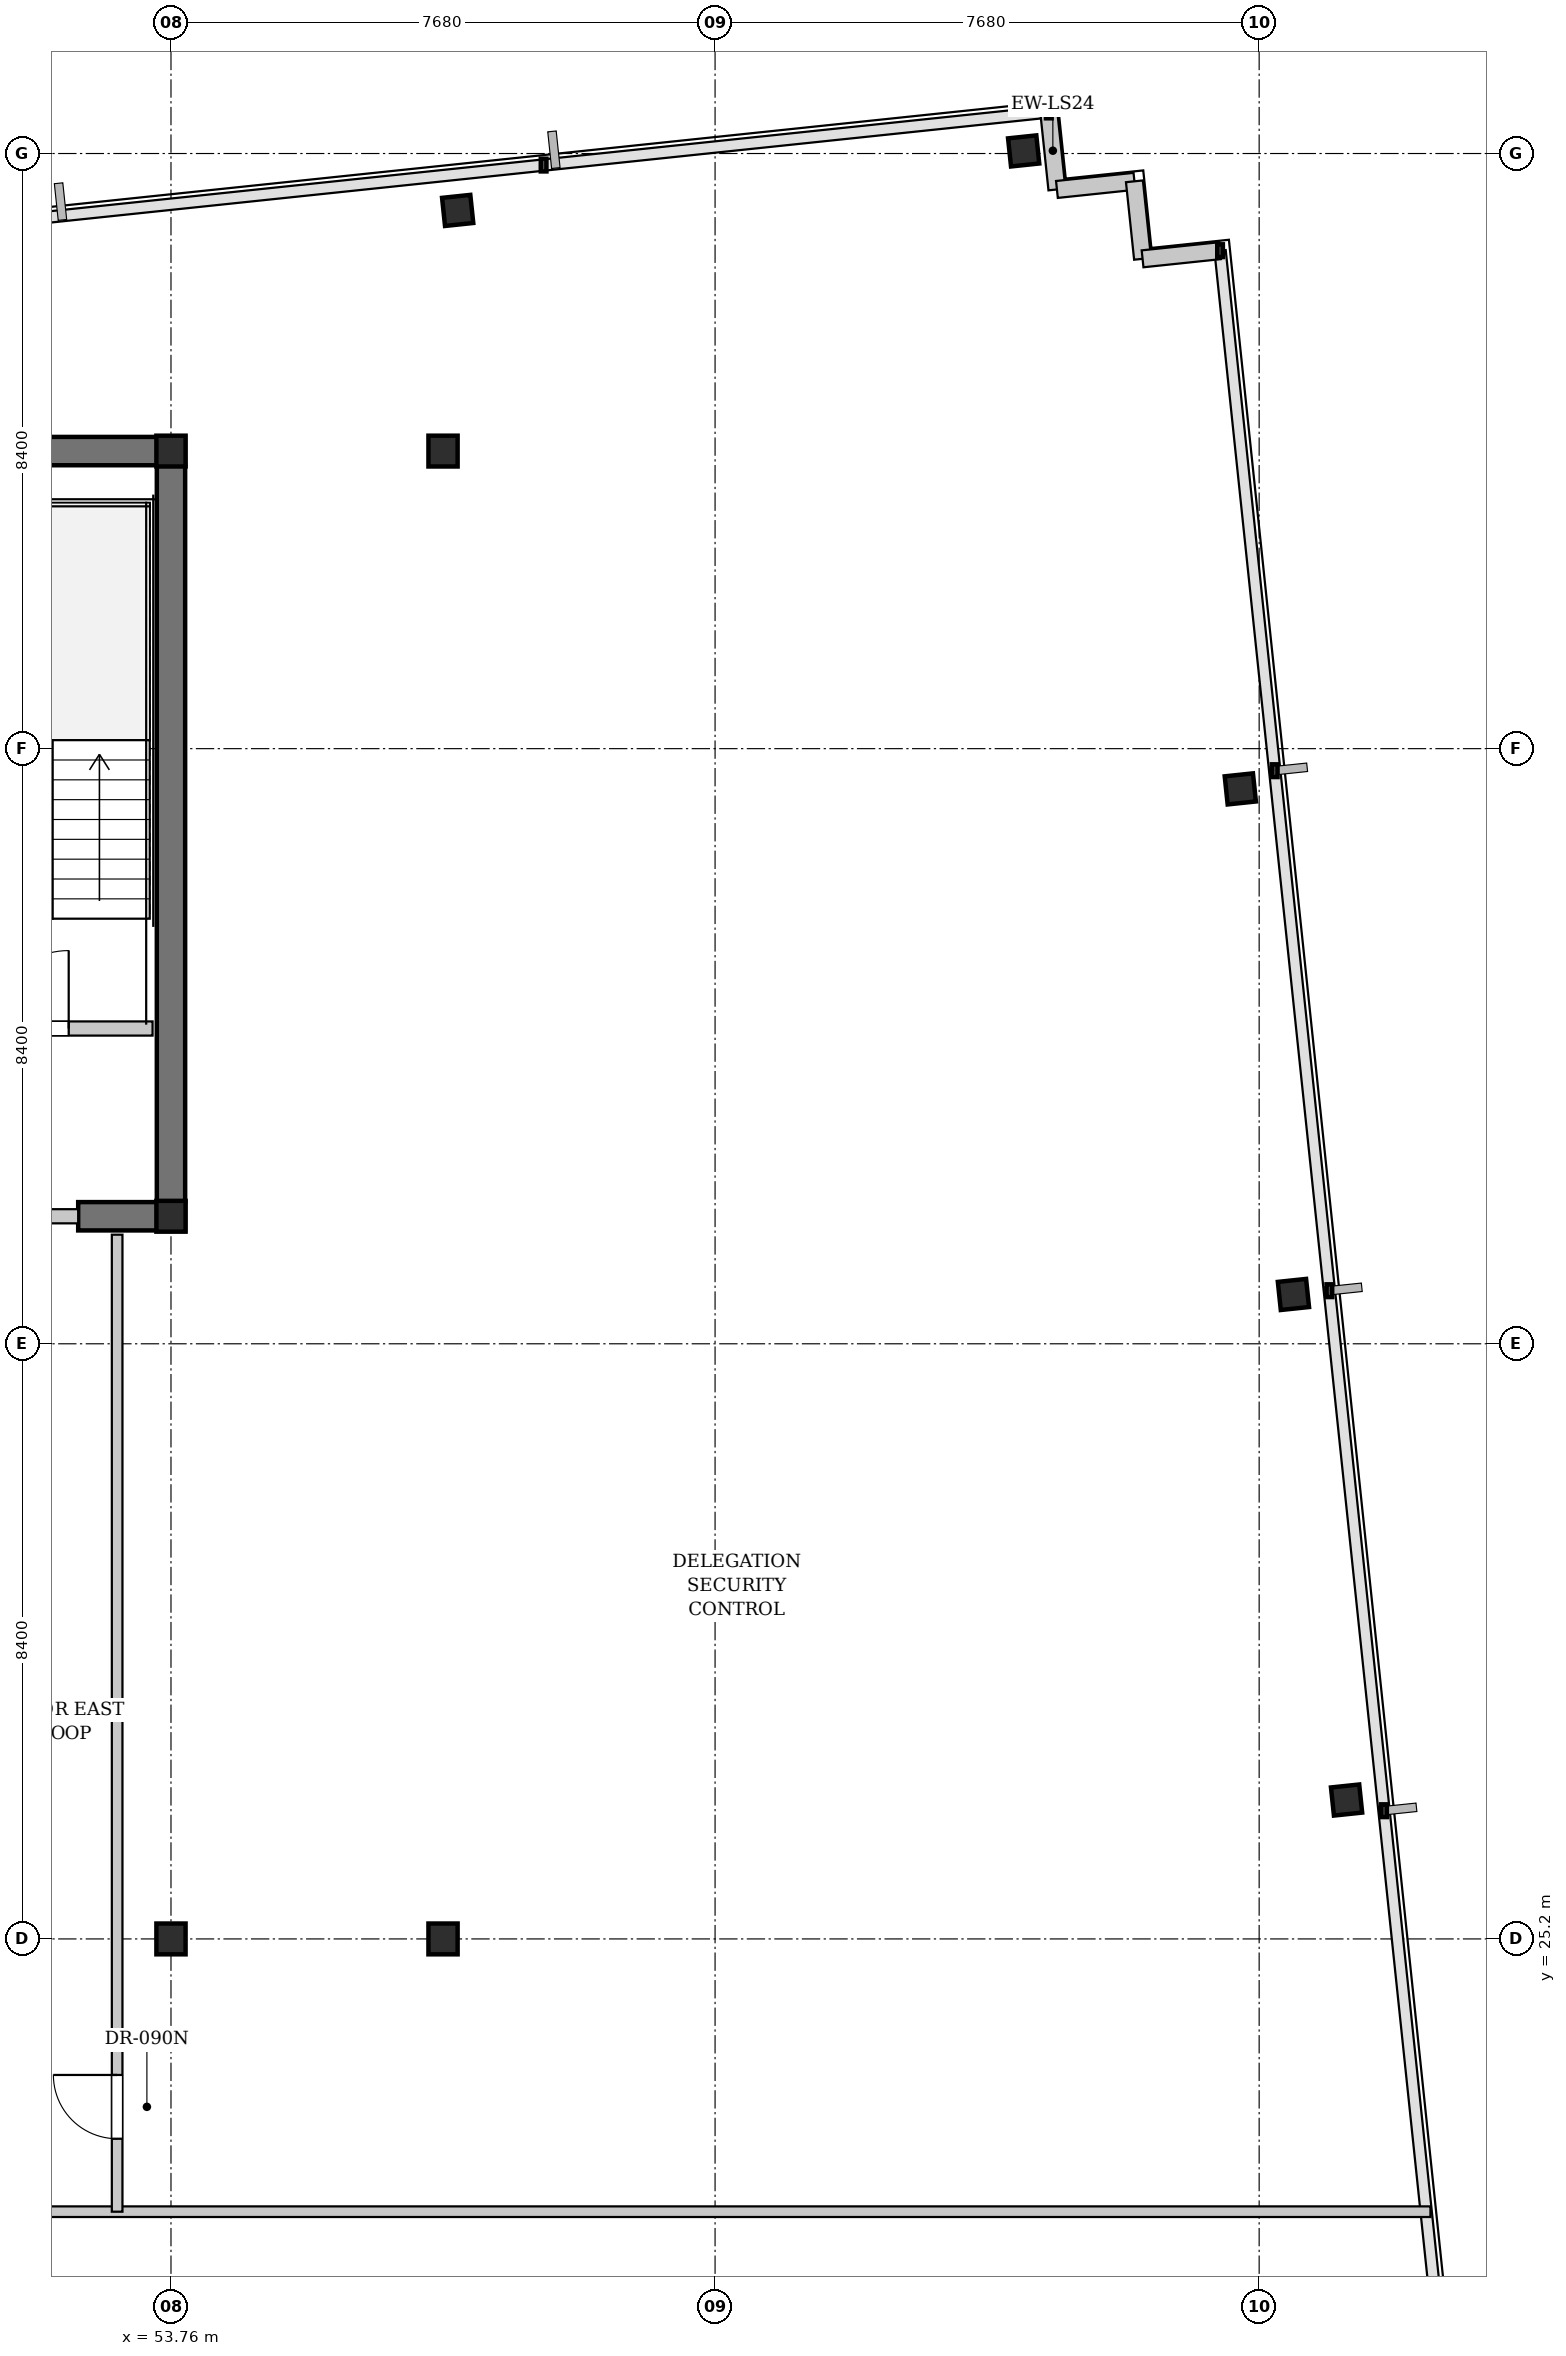
"""IFC4 building model, lengths in metres.
Left out: names, types, materials, properties, quantities, classifications, styles, units other than length and angle.
Written with IfcOpenShell. Run it as: python <this file> out.ifc"""

import sys

from ifc_helpers import new_model, si_unit, direction, frame, frame_2d, origin, origin_2d, place, context, subcontext, project, spatial, rectangle, i_section, extrude, element, fill, save


model = new_model("IFC4")
c1 = context("Model", 3, precision=1e-05, world=origin(), true_north=direction((0.0, 1.0)))
c2 = subcontext(c1, "Body", "Model", "MODEL_VIEW")
j1 = project(units=[si_unit("LENGTHUNIT", "METRE"), si_unit("PLANEANGLEUNIT", "RADIAN")], contexts=[c1])
p1 = place(None, origin())
s1 = spatial("IfcSite", under=j1, at=p1, CompositionType="ELEMENT")
p2 = place(p1, origin())
s2 = spatial("IfcBuilding", under=s1, at=p2, CompositionType="ELEMENT")
p3 = place(p2, frame((0.0, 0.0, 227.6)))
s3 = spatial("IfcBuildingStorey", under=s2, at=p3, CompositionType="ELEMENT", Elevation=227.6)
p4 = place(p3, frame((22.84, 46.2, 0.0), z_axis=(0.0, 0.0, 1.0), x_axis=(1.0, 0.0, 0.0)))
e1 = element("IfcWall", 1, at=p4, inside=s3, PredefinedType="SHEAR", context=c2, shape_type="SweptSolid", body=[
    extrude(rectangle(XDim=31.12, YDim=0.4, at=frame_2d((15.56, 0.0))), origin(), (0.0, 0.0, 1.0), 3.08),
])
p5 = place(p3, frame((52.45, 35.4, 0.0), z_axis=(0.0, 0.0, 1.0), x_axis=(1.0, 0.0, 0.0)))
e2 = element("IfcWall", 2, at=p5, inside=s3, PredefinedType="SHEAR", context=c2, shape_type="SweptSolid", body=[
    extrude(rectangle(XDim=1.51, YDim=0.4, at=frame_2d((0.755, 0.0))), origin(), (0.0, 0.0, 1.0), 3.08),
])
p6 = place(p3, frame((53.76, 35.6, 0.0), z_axis=(0.0, 0.0, 1.0), x_axis=(0.0, 1.0, 0.0)))
e3 = element("IfcWall", 3, at=p6, inside=s3, PredefinedType="SHEAR", context=c2, shape_type="SweptSolid", body=[
    extrude(rectangle(XDim=10.4, YDim=0.4, at=frame_2d((5.2, 0.0))), origin(), (0.0, 0.0, 1.0), 3.08),
])
for number, where, z_axis, x_axis in (
    (4, (53.76, 35.4, 0.0), (0.0, 0.0, 1.0), (1.0, 0.0, 0.0)),
    (5, (53.76, 46.2, 0.0), (0.0, 0.0, 1.0), (1.0, 0.0, 0.0)),
    (6, (53.76, 25.2, 0.0), (0.0, 0.0, 1.0), (1.0, 0.0, 0.0)),
    (7, (57.6, 25.2, 0.0), (0.0, 0.0, 1.0), (1.0, 0.0, 0.0)),
    (8, (57.6, 46.2, 0.0), (0.0, 0.0, 1.0), (1.0, 0.0, 0.0)),
):
    element("IfcColumn", number, at=place(p3, frame(where, z_axis=z_axis, x_axis=x_axis)), inside=s3, PredefinedType="COLUMN", context=c2, shape_type="SweptSolid", body=[
        extrude(i_section(OverallWidth=0.412, OverallDepth=0.435, WebThickness=0.036, FlangeThickness=0.058, FilletRadius=0.015, at=origin_2d()), origin(), (0.0, 0.0, 1.0), 3.3),
    ])
for number, where, z_axis, x_axis in (
    (9, (57.807, 49.597, 0.0), (0.0, 0.0, 1.0), (0.995, 0.105, 0.0)),
    (10, (65.796, 50.437, 0.0), (0.0, 0.0, 1.0), (0.995, 0.105, 0.0)),
    (11, (70.354, 27.16, 0.0), (0.0, 0.0, 1.0), (0.995, 0.105, 0.0)),
    (12, (69.604, 34.296, 0.0), (0.0, 0.0, 1.0), (0.995, 0.105, 0.0)),
    (13, (68.854, 41.432, 0.0), (0.0, 0.0, 1.0), (0.995, 0.105, 0.0)),
):
    element("IfcColumn", number, at=place(p3, frame(where, z_axis=z_axis, x_axis=x_axis)), inside=s3, PredefinedType="COLUMN", context=c2, shape_type="SweptSolid", body=[
        extrude(i_section(OverallWidth=0.401, OverallDepth=0.399, WebThickness=0.025, FlangeThickness=0.04, FilletRadius=0.015, at=origin_2d()), origin(), (0.0, 0.0, 1.0), 3.3),
    ])
for number, where, z_axis, x_axis in (
    (14, (66.15, 50.987, 0.0), (0.0, 0.0, 1.0), (0.105, -0.995, 0.0)),
    (15, (66.265, 49.893, 0.0), (0.0, 0.0, 1.0), (0.995, 0.105, 0.0)),
    (16, (67.359, 50.008, 0.0), (0.0, 0.0, 1.0), (0.105, -0.995, 0.0)),
    (17, (67.474, 48.914, 0.0), (0.0, 0.0, 1.0), (0.995, 0.105, 0.0)),
):
    element("IfcWall", number, at=place(p3, frame(where, z_axis=z_axis, x_axis=x_axis)), inside=s3, PredefinedType="SOLIDWALL", context=c2, shape_type="SweptSolid", body=[
        extrude(rectangle(XDim=1.1, YDim=0.24, at=frame_2d((0.55, 0.0))), origin(), (0.0, 0.0, 1.0), 3.08),
    ])
p7 = place(p3, frame((49.78, 38.05, 0.0), z_axis=(0.0, 0.0, 1.0), x_axis=(1.0, 0.0, 0.0)))
e18 = element("IfcWall", 18, at=p7, inside=s3, PredefinedType="PARTITIONING", context=c2, shape_type="SweptSolid", body=[
    extrude(rectangle(XDim=3.72, YDim=0.2, at=frame_2d((1.86, 0.0))), origin(), (0.0, 0.0, 1.0), 3.08),
])
p8 = place(p7, frame((1.436, 0.0, 0.0)))
e19 = element("IfcOpeningElement", 19, at=p8, cuts=e18, PredefinedType="OPENING", context=c2, shape_type="SweptSolid", body=[
    extrude(rectangle(XDim=1.1, YDim=2.15, at=frame_2d((0.55, 1.075))), frame((0.0, 0.11, 0.0), z_axis=(0.0, -1.0, 0.0), x_axis=(1.0, 0.0, 0.0)), (0.0, 0.0, 1.0), 0.22),
])
p9 = place(p3, frame((50.15, 35.4, 0.0), z_axis=(0.0, 0.0, 1.0), x_axis=(1.0, 0.0, 0.0)))
e20 = element("IfcWall", 20, at=p9, inside=s3, PredefinedType="PARTITIONING", context=c2, shape_type="SweptSolid", body=[
    extrude(rectangle(XDim=2.3, YDim=0.2, at=frame_2d((1.15, 0.0))), origin(), (0.0, 0.0, 1.0), 2.313),
])
p10 = place(p9, frame((0.6, 0.0, 0.0)))
e21 = element("IfcOpeningElement", 21, at=p10, cuts=e20, PredefinedType="OPENING", context=c2, shape_type="SweptSolid", body=[
    extrude(rectangle(XDim=1.1, YDim=2.15, at=frame_2d((0.55, 1.075))), frame((0.0, 0.11, 0.0), z_axis=(0.0, -1.0, 0.0), x_axis=(1.0, 0.0, 0.0)), (0.0, 0.0, 1.0), 0.22),
])
p11 = place(p3, frame((35.62, 21.35, 0.0), z_axis=(0.0, 0.0, 1.0), x_axis=(1.0, 0.0, 0.0)))
e22 = element("IfcWall", 22, at=p11, inside=s3, PredefinedType="PARTITIONING", context=c2, shape_type="SweptSolid", body=[
    extrude(rectangle(XDim=35.918, YDim=0.15, at=frame_2d((17.959, 0.0))), origin(), (0.0, 0.0, 1.0), 3.08),
])
p12 = place(p11, frame((2.376, 0.0, 0.0)))
e23 = element("IfcOpeningElement", 23, at=p12, cuts=e22, PredefinedType="OPENING", context=c2, shape_type="SweptSolid", body=[
    extrude(rectangle(XDim=0.95, YDim=2.15, at=frame_2d((0.475, 1.075))), frame((0.0, 0.085, 0.0), z_axis=(0.0, -1.0, 0.0), x_axis=(1.0, 0.0, 0.0)), (0.0, 0.0, 1.0), 0.17),
])
p13 = place(p11, frame((8.18, 0.0, 0.0)))
e24 = element("IfcOpeningElement", 24, at=p13, cuts=e22, PredefinedType="OPENING", context=c2, shape_type="SweptSolid", body=[
    extrude(rectangle(XDim=0.95, YDim=2.15, at=frame_2d((0.475, 1.075))), frame((0.0, 0.085, 0.0), z_axis=(0.0, -1.0, 0.0), x_axis=(1.0, 0.0, 0.0)), (0.0, 0.0, 1.0), 0.17),
])
p14 = place(p11, frame((14.139, 0.0, 0.0)))
e25 = element("IfcOpeningElement", 25, at=p14, cuts=e22, PredefinedType="OPENING", context=c2, shape_type="SweptSolid", body=[
    extrude(rectangle(XDim=0.95, YDim=2.15, at=frame_2d((0.475, 1.075))), frame((0.0, 0.085, 0.0), z_axis=(0.0, -1.0, 0.0), x_axis=(1.0, 0.0, 0.0)), (0.0, 0.0, 1.0), 0.17),
])
p15 = place(p3, frame((53.0, 21.35, 0.0), z_axis=(0.0, 0.0, 1.0), x_axis=(0.0, 1.0, 0.0)))
e26 = element("IfcWall", 26, at=p15, inside=s3, PredefinedType="PARTITIONING", context=c2, shape_type="SweptSolid", body=[
    extrude(rectangle(XDim=13.79, YDim=0.15, at=frame_2d((6.895, 0.0))), origin(), (0.0, 0.0, 1.0), 3.08),
])
p16 = place(p15, frame((1.03, 0.0, 0.0)))
e27 = element("IfcOpeningElement", 27, at=p16, cuts=e26, PredefinedType="OPENING", context=c2, shape_type="SweptSolid", body=[
    extrude(rectangle(XDim=0.9, YDim=2.15, at=frame_2d((0.45, 1.075))), frame((0.0, 0.085, 0.0), z_axis=(0.0, -1.0, 0.0), x_axis=(1.0, 0.0, 0.0)), (0.0, 0.0, 1.0), 0.17),
])
p17 = place(p8, origin())
e28 = element("IfcDoor", 28, at=p17, inside=s3, OperationType="SINGLE_SWING_RIGHT", PredefinedType="DOOR", context=c2, shape_type="SweptSolid", body=[
    extrude(rectangle(XDim=1.1, YDim=2.15, at=frame_2d((0.55, 1.075))), frame((0.0, 0.025, 0.0), z_axis=(0.0, -1.0, 0.0), x_axis=(1.0, 0.0, 0.0)), (0.0, 0.0, 1.0), 0.05),
])
fill(e19, e28)
p18 = place(p16, origin())
e29 = element("IfcDoor", 29, at=p18, inside=s3, OperationType="SINGLE_SWING_RIGHT", PredefinedType="DOOR", context=c2, shape_type="SweptSolid", body=[
    extrude(rectangle(XDim=0.9, YDim=2.15, at=frame_2d((0.45, 1.075))), frame((0.0, 0.025, 0.0), z_axis=(0.0, -1.0, 0.0), x_axis=(1.0, 0.0, 0.0)), (0.0, 0.0, 1.0), 0.05),
])
fill(e27, e29)
save(model, sys.argv[1])
